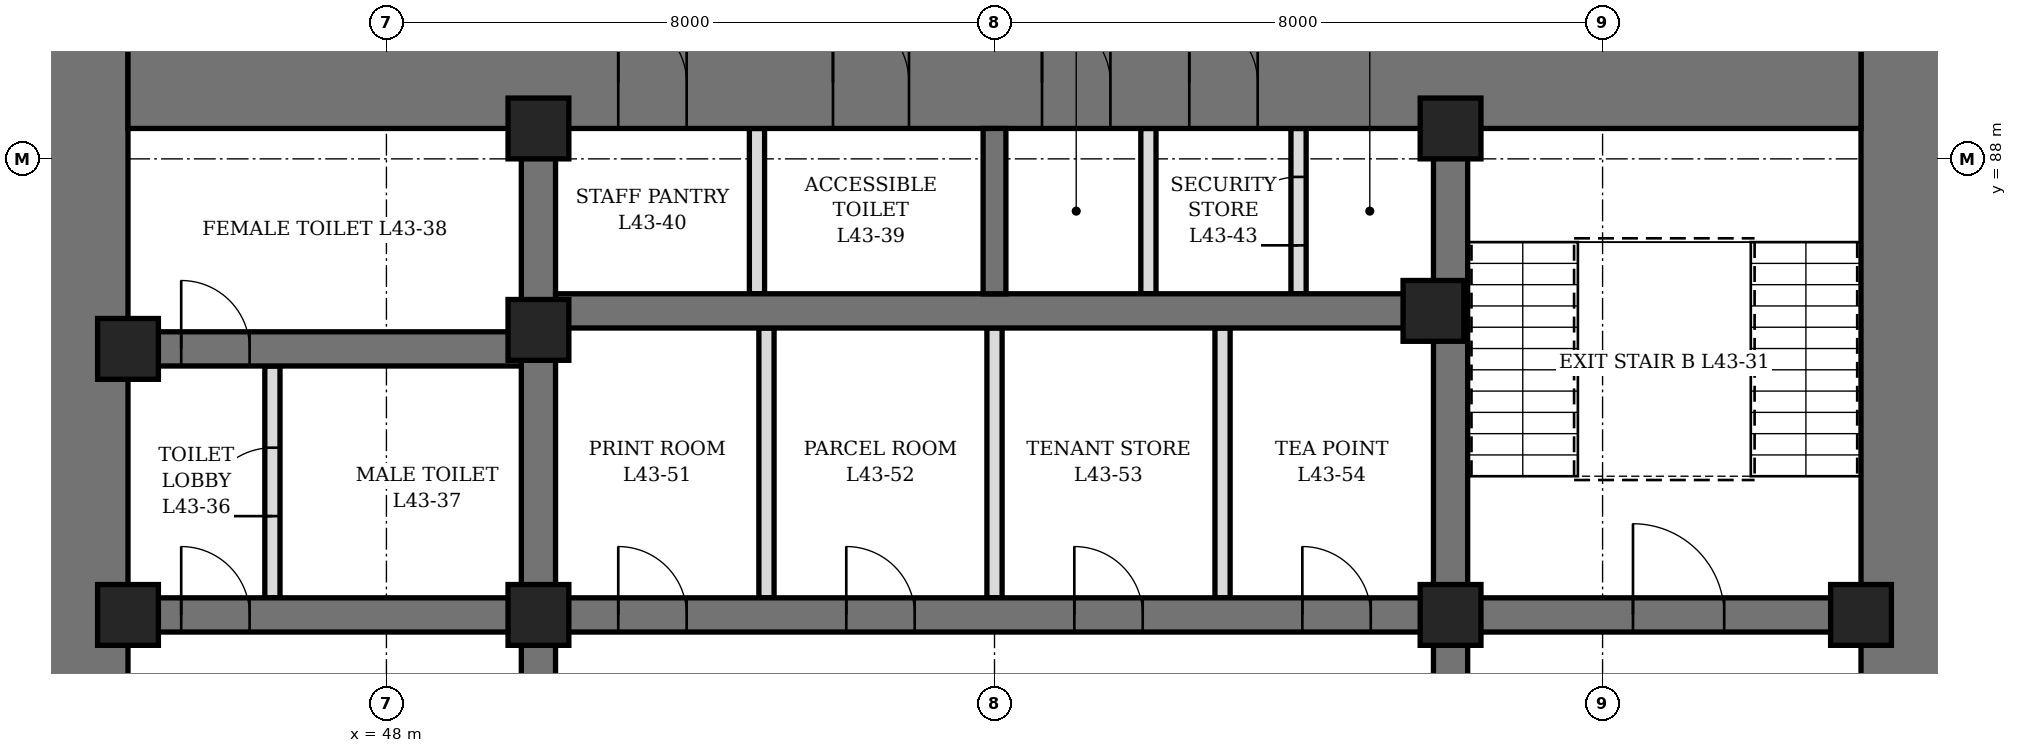
"""IFC4 building model, lengths in metres.
Left out: names, types, materials, properties, quantities, classifications, styles, units other than length and angle.
Written with IfcOpenShell. Run it as: python <this file> out.ifc"""

import sys

from ifc_helpers import new_model, si_unit, direction, frame, frame_2d, origin, origin_2d, place, context, subcontext, project, spatial, rectangle, hollow_rectangle, extrude, element, fill, save


model = new_model("IFC4")
c1 = context("Model", 3, precision=1e-05, world=origin(), true_north=direction((0.0, 1.0)))
c2 = subcontext(c1, "Body", "Model", "MODEL_VIEW")
j1 = project(units=[si_unit("LENGTHUNIT", "METRE"), si_unit("PLANEANGLEUNIT", "RADIAN")], contexts=[c1])
p1 = place(None, origin())
s1 = spatial("IfcSite", under=j1, at=p1, CompositionType="ELEMENT")
p2 = place(p1, origin())
s2 = spatial("IfcBuilding", under=s1, at=p2, CompositionType="ELEMENT")
p3 = place(p2, frame((0.0, 0.0, 193.9)))
s3 = spatial("IfcBuildingStorey", under=s2, at=p3, CompositionType="ELEMENT", Elevation=193.9)
p4 = place(p3, frame((44.0, 70.4, 0.0), z_axis=(0.0, 0.0, 1.0), x_axis=(0.0, 1.0, 0.0)))
e1 = element("IfcWall", 1, at=p4, inside=s3, PredefinedType="SHEAR", context=c2, shape_type="SweptSolid", body=[
    extrude(rectangle(XDim=19.2, YDim=1.2, at=frame_2d((9.6, 0.0))), origin(), (0.0, 0.0, 1.0), 4.2),
])
p5 = place(p4, frame((8.6, 0.0, 0.0)))
e2 = element("IfcOpeningElement", 2, at=p5, cuts=e1, PredefinedType="OPENING", context=c2, shape_type="SweptSolid", body=[
    extrude(rectangle(XDim=2.0, YDim=2.4, at=frame_2d((1.0, 1.2))), frame((0.0, 0.61, 0.0), z_axis=(0.0, -1.0, 0.0), x_axis=(1.0, 0.0, 0.0)), (0.0, 0.0, 1.0), 1.22),
])
p6 = place(p3, frame((68.0, 70.4, 0.0), z_axis=(0.0, 0.0, 1.0), x_axis=(0.0, 1.0, 0.0)))
e3 = element("IfcWall", 3, at=p6, inside=s3, PredefinedType="SHEAR", context=c2, shape_type="SweptSolid", body=[
    extrude(rectangle(XDim=19.2, YDim=1.2, at=frame_2d((9.6, 0.0))), origin(), (0.0, 0.0, 1.0), 4.2),
])
p7 = place(p6, frame((8.6, 0.0, 0.0)))
e4 = element("IfcOpeningElement", 4, at=p7, cuts=e3, PredefinedType="OPENING", context=c2, shape_type="SweptSolid", body=[
    extrude(rectangle(XDim=2.0, YDim=2.4, at=frame_2d((1.0, 1.2))), frame((0.0, 0.61, 0.0), z_axis=(0.0, -1.0, 0.0), x_axis=(1.0, 0.0, 0.0)), (0.0, 0.0, 1.0), 1.22),
])
p8 = place(p3, frame((44.6, 89.0, 0.0), z_axis=(0.0, 0.0, 1.0), x_axis=(1.0, 0.0, 0.0)))
e5 = element("IfcWall", 5, at=p8, inside=s3, PredefinedType="SHEAR", context=c2, shape_type="SweptSolid", body=[
    extrude(rectangle(XDim=22.8, YDim=1.2, at=frame_2d((11.4, 0.0))), origin(), (0.0, 0.0, 1.0), 4.2),
])
p9 = place(p8, frame((9.275, 0.0, 0.0)))
e6 = element("IfcOpeningElement", 6, at=p9, cuts=e5, PredefinedType="OPENING", context=c2, shape_type="SweptSolid", body=[
    extrude(rectangle(XDim=1.0, YDim=2.1, at=frame_2d((0.5, 1.05))), frame((0.0, 0.61, 0.0), z_axis=(0.0, -1.0, 0.0), x_axis=(1.0, 0.0, 0.0)), (0.0, 0.0, 1.0), 1.22),
])
p10 = place(p8, frame((6.45, 0.0, 0.0)))
e7 = element("IfcOpeningElement", 7, at=p10, cuts=e5, PredefinedType="OPENING", context=c2, shape_type="SweptSolid", body=[
    extrude(rectangle(XDim=0.9, YDim=2.1, at=frame_2d((0.45, 1.05))), frame((0.0, 0.61, 0.0), z_axis=(0.0, -1.0, 0.0), x_axis=(1.0, 0.0, 0.0)), (0.0, 0.0, 1.0), 1.22),
])
p11 = place(p8, frame((12.025, 0.0, 0.0)))
e8 = element("IfcOpeningElement", 8, at=p11, cuts=e5, PredefinedType="OPENING", context=c2, shape_type="SweptSolid", body=[
    extrude(rectangle(XDim=0.9, YDim=2.1, at=frame_2d((0.45, 1.05))), frame((0.0, 0.61, 0.0), z_axis=(0.0, -1.0, 0.0), x_axis=(1.0, 0.0, 0.0)), (0.0, 0.0, 1.0), 1.22),
])
p12 = place(p8, frame((13.962, 0.0, 0.0)))
e9 = element("IfcOpeningElement", 9, at=p12, cuts=e5, PredefinedType="OPENING", context=c2, shape_type="SweptSolid", body=[
    extrude(rectangle(XDim=0.9, YDim=2.1, at=frame_2d((0.45, 1.05))), frame((0.0, 0.61, 0.0), z_axis=(0.0, -1.0, 0.0), x_axis=(1.0, 0.0, 0.0)), (0.0, 0.0, 1.0), 1.22),
])
p13 = place(p3, frame((50.0, 71.6, 0.0), z_axis=(0.0, 0.0, 1.0), x_axis=(0.0, 1.0, 0.0)))
e10 = element("IfcWall", 10, at=p13, inside=s3, PredefinedType="SHEAR", context=c2, shape_type="SweptSolid", body=[
    extrude(rectangle(XDim=16.8, YDim=0.45, at=frame_2d((8.4, 0.0))), origin(), (0.0, 0.0, 1.0), 4.2),
])
p14 = place(p13, frame((7.5, 0.0, 0.0)))
e11 = element("IfcOpeningElement", 11, at=p14, cuts=e10, PredefinedType="OPENING", context=c2, shape_type="SweptSolid", body=[
    extrude(rectangle(XDim=1.8, YDim=2.4, at=frame_2d((0.9, 1.2))), frame((0.0, 0.235, 0.0), z_axis=(0.0, -1.0, 0.0), x_axis=(1.0, 0.0, 0.0)), (0.0, 0.0, 1.0), 0.47),
])
p15 = place(p3, frame((62.0, 71.6, 0.0), z_axis=(0.0, 0.0, 1.0), x_axis=(0.0, 1.0, 0.0)))
e12 = element("IfcWall", 12, at=p15, inside=s3, PredefinedType="SHEAR", context=c2, shape_type="SweptSolid", body=[
    extrude(rectangle(XDim=16.8, YDim=0.45, at=frame_2d((8.4, 0.0))), origin(), (0.0, 0.0, 1.0), 4.2),
])
p16 = place(p15, frame((7.5, 0.0, 0.0)))
e13 = element("IfcOpeningElement", 13, at=p16, cuts=e12, PredefinedType="OPENING", context=c2, shape_type="SweptSolid", body=[
    extrude(rectangle(XDim=1.8, YDim=2.4, at=frame_2d((0.9, 1.2))), frame((0.0, 0.235, 0.0), z_axis=(0.0, -1.0, 0.0), x_axis=(1.0, 0.0, 0.0)), (0.0, 0.0, 1.0), 0.47),
])
p17 = place(p3, frame((44.6, 82.0, 0.0), z_axis=(0.0, 0.0, 1.0), x_axis=(1.0, 0.0, 0.0)))
e14 = element("IfcWall", 14, at=p17, inside=s3, PredefinedType="SHEAR", context=c2, shape_type="SweptSolid", body=[
    extrude(rectangle(XDim=5.175, YDim=0.45, at=frame_2d((2.587, 0.0))), origin(), (0.0, 0.0, 1.0), 4.2),
])
p18 = place(p17, frame((0.7, 0.0, 0.0)))
e15 = element("IfcOpeningElement", 15, at=p18, cuts=e14, PredefinedType="OPENING", context=c2, shape_type="SweptSolid", body=[
    extrude(rectangle(XDim=0.9, YDim=2.1, at=frame_2d((0.45, 1.05))), frame((0.0, 0.235, 0.0), z_axis=(0.0, -1.0, 0.0), x_axis=(1.0, 0.0, 0.0)), (0.0, 0.0, 1.0), 0.47),
])
p19 = place(p3, frame((44.6, 85.5, 0.0), z_axis=(0.0, 0.0, 1.0), x_axis=(1.0, 0.0, 0.0)))
e16 = element("IfcWall", 16, at=p19, inside=s3, PredefinedType="SHEAR", context=c2, shape_type="SweptSolid", body=[
    extrude(rectangle(XDim=5.175, YDim=0.45, at=frame_2d((2.587, 0.0))), origin(), (0.0, 0.0, 1.0), 4.2),
])
p20 = place(p19, frame((0.7, 0.0, 0.0)))
e17 = element("IfcOpeningElement", 17, at=p20, cuts=e16, PredefinedType="OPENING", context=c2, shape_type="SweptSolid", body=[
    extrude(rectangle(XDim=0.9, YDim=2.1, at=frame_2d((0.45, 1.05))), frame((0.0, 0.235, 0.0), z_axis=(0.0, -1.0, 0.0), x_axis=(1.0, 0.0, 0.0)), (0.0, 0.0, 1.0), 0.47),
])
p21 = place(p3, frame((62.225, 82.0, 0.0), z_axis=(0.0, 0.0, 1.0), x_axis=(1.0, 0.0, 0.0)))
e18 = element("IfcWall", 18, at=p21, inside=s3, PredefinedType="SHEAR", context=c2, shape_type="SweptSolid", body=[
    extrude(rectangle(XDim=5.175, YDim=0.45, at=frame_2d((2.587, 0.0))), origin(), (0.0, 0.0, 1.0), 4.2),
])
p22 = place(p21, frame((2.175, 0.0, 0.0)))
e19 = element("IfcOpeningElement", 19, at=p22, cuts=e18, PredefinedType="OPENING", context=c2, shape_type="SweptSolid", body=[
    extrude(rectangle(XDim=1.2, YDim=2.1, at=frame_2d((0.6, 1.05))), frame((0.0, 0.235, 0.0), z_axis=(0.0, -1.0, 0.0), x_axis=(1.0, 0.0, 0.0)), (0.0, 0.0, 1.0), 0.47),
])
p23 = place(p3, frame((50.225, 82.0, 0.0), z_axis=(0.0, 0.0, 1.0), x_axis=(1.0, 0.0, 0.0)))
e20 = element("IfcWall", 20, at=p23, inside=s3, PredefinedType="SHEAR", context=c2, shape_type="SweptSolid", body=[
    extrude(rectangle(XDim=11.55, YDim=0.45, at=frame_2d((5.775, 0.0))), origin(), (0.0, 0.0, 1.0), 4.2),
])
p24 = place(p23, frame((0.825, 0.0, 0.0)))
e21 = element("IfcOpeningElement", 21, at=p24, cuts=e20, PredefinedType="OPENING", context=c2, shape_type="SweptSolid", body=[
    extrude(rectangle(XDim=0.9, YDim=2.1, at=frame_2d((0.45, 1.05))), frame((0.0, 0.235, 0.0), z_axis=(0.0, -1.0, 0.0), x_axis=(1.0, 0.0, 0.0)), (0.0, 0.0, 1.0), 0.47),
])
p25 = place(p23, frame((3.825, 0.0, 0.0)))
e22 = element("IfcOpeningElement", 22, at=p25, cuts=e20, PredefinedType="OPENING", context=c2, shape_type="SweptSolid", body=[
    extrude(rectangle(XDim=0.9, YDim=2.1, at=frame_2d((0.45, 1.05))), frame((0.0, 0.235, 0.0), z_axis=(0.0, -1.0, 0.0), x_axis=(1.0, 0.0, 0.0)), (0.0, 0.0, 1.0), 0.47),
])
p26 = place(p23, frame((6.825, 0.0, 0.0)))
e23 = element("IfcOpeningElement", 23, at=p26, cuts=e20, PredefinedType="OPENING", context=c2, shape_type="SweptSolid", body=[
    extrude(rectangle(XDim=0.9, YDim=2.1, at=frame_2d((0.45, 1.05))), frame((0.0, 0.235, 0.0), z_axis=(0.0, -1.0, 0.0), x_axis=(1.0, 0.0, 0.0)), (0.0, 0.0, 1.0), 0.47),
])
p27 = place(p23, frame((9.825, 0.0, 0.0)))
e24 = element("IfcOpeningElement", 24, at=p27, cuts=e20, PredefinedType="OPENING", context=c2, shape_type="SweptSolid", body=[
    extrude(rectangle(XDim=0.9, YDim=2.1, at=frame_2d((0.45, 1.05))), frame((0.0, 0.235, 0.0), z_axis=(0.0, -1.0, 0.0), x_axis=(1.0, 0.0, 0.0)), (0.0, 0.0, 1.0), 0.47),
])
p28 = place(p3, frame((50.225, 86.0, 0.0), z_axis=(0.0, 0.0, 1.0), x_axis=(1.0, 0.0, 0.0)))
e25 = element("IfcWall", 25, at=p28, inside=s3, PredefinedType="SHEAR", context=c2, shape_type="SweptSolid", body=[
    extrude(rectangle(XDim=11.55, YDim=0.45, at=frame_2d((5.775, 0.0))), origin(), (0.0, 0.0, 1.0), 4.2),
])
p29 = place(p3, frame((56.0, 86.225, 0.0), z_axis=(0.0, 0.0, 1.0), x_axis=(0.0, 1.0, 0.0)))
e26 = element("IfcWall", 26, at=p29, inside=s3, PredefinedType="SHEAR", context=c2, shape_type="SweptSolid", body=[
    extrude(rectangle(XDim=2.175, YDim=0.3, at=frame_2d((1.087, 0.0))), origin(), (0.0, 0.0, 1.0), 4.2),
])
for number, where, z_axis, x_axis in (
    (27, (44.6, 82.0, 0.0), (0.0, 0.0, 1.0), (1.0, 0.0, 0.0)),
    (28, (44.6, 85.5, 0.0), (0.0, 0.0, 1.0), (1.0, 0.0, 0.0)),
    (29, (50.0, 82.0, 0.0), (0.0, 0.0, 1.0), (1.0, 0.0, 0.0)),
    (30, (50.0, 85.75, 0.0), (0.0, 0.0, 1.0), (1.0, 0.0, 0.0)),
    (31, (50.0, 88.4, 0.0), (0.0, 0.0, 1.0), (1.0, 0.0, 0.0)),
    (32, (61.775, 86.0, 0.0), (0.0, 0.0, 1.0), (1.0, 0.0, 0.0)),
    (33, (62.0, 82.0, 0.0), (0.0, 0.0, 1.0), (1.0, 0.0, 0.0)),
    (34, (62.0, 88.4, 0.0), (0.0, 0.0, 1.0), (1.0, 0.0, 0.0)),
    (35, (67.4, 82.0, 0.0), (0.0, 0.0, 1.0), (1.0, 0.0, 0.0)),
):
    element("IfcColumn", number, at=place(p3, frame(where, z_axis=z_axis, x_axis=x_axis)), inside=s3, PredefinedType="COLUMN", context=c2, shape_type="SweptSolid", body=[
        extrude(hollow_rectangle(XDim=0.8, YDim=0.8, WallThickness=0.1, at=origin_2d()), origin(), (0.0, 0.0, 1.0), 4.2),
    ])
p30 = place(p3, frame((46.5, 82.225, 0.0), z_axis=(0.0, 0.0, 1.0), x_axis=(0.0, 1.0, 0.0)))
e36 = element("IfcWall", 36, at=p30, inside=s3, PredefinedType="PARTITIONING", context=c2, shape_type="SweptSolid", body=[
    extrude(rectangle(XDim=3.05, YDim=0.2, at=frame_2d((1.525, 0.0))), origin(), (0.0, 0.0, 1.0), 4.04),
])
p31 = place(p30, frame((1.075, 0.0, 0.0)))
e37 = element("IfcOpeningElement", 37, at=p31, cuts=e36, PredefinedType="OPENING", context=c2, shape_type="SweptSolid", body=[
    extrude(rectangle(XDim=0.9, YDim=2.1, at=frame_2d((0.45, 1.05))), frame((0.0, 0.11, 0.0), z_axis=(0.0, -1.0, 0.0), x_axis=(1.0, 0.0, 0.0)), (0.0, 0.0, 1.0), 0.22),
])
p32 = place(p3, frame((52.875, 86.225, 0.0), z_axis=(0.0, 0.0, 1.0), x_axis=(0.0, 1.0, 0.0)))
e38 = element("IfcWall", 38, at=p32, inside=s3, PredefinedType="PARTITIONING", context=c2, shape_type="SweptSolid", body=[
    extrude(rectangle(XDim=2.175, YDim=0.2, at=frame_2d((1.087, 0.0))), origin(), (0.0, 0.0, 1.0), 4.04),
])
p33 = place(p3, frame((60.0, 86.225, 0.0), z_axis=(0.0, 0.0, 1.0), x_axis=(0.0, 1.0, 0.0)))
e39 = element("IfcWall", 39, at=p33, inside=s3, PredefinedType="PARTITIONING", context=c2, shape_type="SweptSolid", body=[
    extrude(rectangle(XDim=2.175, YDim=0.2, at=frame_2d((1.087, 0.0))), origin(), (0.0, 0.0, 1.0), 4.04),
])
p34 = place(p33, frame((0.637, 0.0, 0.0)))
e40 = element("IfcOpeningElement", 40, at=p34, cuts=e39, PredefinedType="OPENING", context=c2, shape_type="SweptSolid", body=[
    extrude(rectangle(XDim=0.9, YDim=2.1, at=frame_2d((0.45, 1.05))), frame((0.0, 0.11, 0.0), z_axis=(0.0, -1.0, 0.0), x_axis=(1.0, 0.0, 0.0)), (0.0, 0.0, 1.0), 0.22),
])
p35 = place(p3, frame((58.025, 86.225, 0.0), z_axis=(0.0, 0.0, 1.0), x_axis=(0.0, 1.0, 0.0)))
e41 = element("IfcWall", 41, at=p35, inside=s3, PredefinedType="PARTITIONING", context=c2, shape_type="SweptSolid", body=[
    extrude(rectangle(XDim=2.175, YDim=0.2, at=frame_2d((1.087, 0.0))), origin(), (0.0, 0.0, 1.0), 4.04),
])
p36 = place(p3, frame((53.0, 82.225, 0.0), z_axis=(0.0, 0.0, 1.0), x_axis=(0.0, 1.0, 0.0)))
e42 = element("IfcWall", 42, at=p36, inside=s3, PredefinedType="PARTITIONING", context=c2, shape_type="SweptSolid", body=[
    extrude(rectangle(XDim=3.55, YDim=0.2, at=frame_2d((1.775, 0.0))), origin(), (0.0, 0.0, 1.0), 4.04),
])
p37 = place(p3, frame((56.0, 82.225, 0.0), z_axis=(0.0, 0.0, 1.0), x_axis=(0.0, 1.0, 0.0)))
e43 = element("IfcWall", 43, at=p37, inside=s3, PredefinedType="PARTITIONING", context=c2, shape_type="SweptSolid", body=[
    extrude(rectangle(XDim=3.55, YDim=0.2, at=frame_2d((1.775, 0.0))), origin(), (0.0, 0.0, 1.0), 3.14),
])
p38 = place(p3, frame((59.0, 82.225, 0.0), z_axis=(0.0, 0.0, 1.0), x_axis=(0.0, 1.0, 0.0)))
e44 = element("IfcWall", 44, at=p38, inside=s3, PredefinedType="PARTITIONING", context=c2, shape_type="SweptSolid", body=[
    extrude(rectangle(XDim=3.55, YDim=0.2, at=frame_2d((1.775, 0.0))), origin(), (0.0, 0.0, 1.0), 4.04),
])
p39 = place(p18, origin())
e45 = element("IfcDoor", 45, at=p39, inside=s3, OperationType="SINGLE_SWING_LEFT", PredefinedType="DOOR", context=c2, shape_type="SweptSolid", body=[
    extrude(rectangle(XDim=0.9, YDim=2.1, at=frame_2d((0.45, 1.05))), frame((0.0, 0.225, 0.0), z_axis=(0.0, -1.0, 0.0), x_axis=(1.0, 0.0, 0.0)), (0.0, 0.0, 1.0), 0.449),
])
fill(e15, e45)
p40 = place(p31, origin())
e46 = element("IfcDoor", 46, at=p40, inside=s3, OperationType="SINGLE_SWING_RIGHT", PredefinedType="DOOR", context=c2, shape_type="SweptSolid", body=[
    extrude(rectangle(XDim=0.9, YDim=2.1, at=frame_2d((0.45, 1.05))), frame((0.0, 0.1, 0.0), z_axis=(0.0, -1.0, 0.0), x_axis=(1.0, 0.0, 0.0)), (0.0, 0.0, 1.0), 0.199),
])
fill(e37, e46)
p41 = place(p20, origin())
e47 = element("IfcDoor", 47, at=p41, inside=s3, OperationType="SINGLE_SWING_RIGHT", PredefinedType="DOOR", context=c2, shape_type="SweptSolid", body=[
    extrude(rectangle(XDim=0.9, YDim=2.1, at=frame_2d((0.45, 1.05))), frame((0.0, 0.225, 0.0), z_axis=(0.0, -1.0, 0.0), x_axis=(1.0, 0.0, 0.0)), (0.0, 0.0, 1.0), 0.449),
])
fill(e17, e47)
p42 = place(p9, origin())
e48 = element("IfcDoor", 48, at=p42, inside=s3, OperationType="SINGLE_SWING_LEFT", PredefinedType="DOOR", context=c2, shape_type="SweptSolid", body=[
    extrude(rectangle(XDim=1.0, YDim=2.1, at=frame_2d((0.5, 1.05))), frame((0.0, 0.35, 0.0), z_axis=(0.0, -1.0, 0.0), x_axis=(1.0, 0.0, 0.0)), (0.0, 0.0, 1.0), 0.7),
])
fill(e6, e48)
p43 = place(p10, origin())
e49 = element("IfcDoor", 49, at=p43, inside=s3, OperationType="SINGLE_SWING_LEFT", PredefinedType="DOOR", context=c2, shape_type="SweptSolid", body=[
    extrude(rectangle(XDim=0.9, YDim=2.1, at=frame_2d((0.45, 1.05))), frame((0.0, 0.35, 0.0), z_axis=(0.0, -1.0, 0.0), x_axis=(1.0, 0.0, 0.0)), (0.0, 0.0, 1.0), 0.7),
])
fill(e7, e49)
p44 = place(p11, origin())
e50 = element("IfcDoor", 50, at=p44, inside=s3, OperationType="SINGLE_SWING_LEFT", PredefinedType="DOOR", context=c2, shape_type="SweptSolid", body=[
    extrude(rectangle(XDim=0.9, YDim=2.1, at=frame_2d((0.45, 1.05))), frame((0.0, 0.35, 0.0), z_axis=(0.0, -1.0, 0.0), x_axis=(1.0, 0.0, 0.0)), (0.0, 0.0, 1.0), 0.7),
])
fill(e8, e50)
p45 = place(p12, origin())
e51 = element("IfcDoor", 51, at=p45, inside=s3, OperationType="SINGLE_SWING_LEFT", PredefinedType="DOOR", context=c2, shape_type="SweptSolid", body=[
    extrude(rectangle(XDim=0.9, YDim=2.1, at=frame_2d((0.45, 1.05))), frame((0.0, 0.35, 0.0), z_axis=(0.0, -1.0, 0.0), x_axis=(1.0, 0.0, 0.0)), (0.0, 0.0, 1.0), 0.7),
])
fill(e9, e51)
p46 = place(p34, origin())
e52 = element("IfcDoor", 52, at=p46, inside=s3, OperationType="SINGLE_SWING_LEFT", PredefinedType="DOOR", context=c2, shape_type="SweptSolid", body=[
    extrude(rectangle(XDim=0.9, YDim=2.1, at=frame_2d((0.45, 1.05))), frame((0.0, 0.1, 0.0), z_axis=(0.0, -1.0, 0.0), x_axis=(1.0, 0.0, 0.0)), (0.0, 0.0, 1.0), 0.199),
])
fill(e40, e52)
p47 = place(p24, origin())
e53 = element("IfcDoor", 53, at=p47, inside=s3, OperationType="SINGLE_SWING_LEFT", PredefinedType="DOOR", context=c2, shape_type="SweptSolid", body=[
    extrude(rectangle(XDim=0.9, YDim=2.1, at=frame_2d((0.45, 1.05))), frame((0.0, 0.225, 0.0), z_axis=(0.0, -1.0, 0.0), x_axis=(1.0, 0.0, 0.0)), (0.0, 0.0, 1.0), 0.449),
])
fill(e21, e53)
p48 = place(p25, origin())
e54 = element("IfcDoor", 54, at=p48, inside=s3, OperationType="SINGLE_SWING_LEFT", PredefinedType="DOOR", context=c2, shape_type="SweptSolid", body=[
    extrude(rectangle(XDim=0.9, YDim=2.1, at=frame_2d((0.45, 1.05))), frame((0.0, 0.225, 0.0), z_axis=(0.0, -1.0, 0.0), x_axis=(1.0, 0.0, 0.0)), (0.0, 0.0, 1.0), 0.449),
])
fill(e22, e54)
p49 = place(p26, origin())
e55 = element("IfcDoor", 55, at=p49, inside=s3, OperationType="SINGLE_SWING_LEFT", PredefinedType="DOOR", context=c2, shape_type="SweptSolid", body=[
    extrude(rectangle(XDim=0.9, YDim=2.1, at=frame_2d((0.45, 1.05))), frame((0.0, 0.225, 0.0), z_axis=(0.0, -1.0, 0.0), x_axis=(1.0, 0.0, 0.0)), (0.0, 0.0, 1.0), 0.449),
])
fill(e23, e55)
p50 = place(p27, origin())
e56 = element("IfcDoor", 56, at=p50, inside=s3, OperationType="SINGLE_SWING_LEFT", PredefinedType="DOOR", context=c2, shape_type="SweptSolid", body=[
    extrude(rectangle(XDim=0.9, YDim=2.1, at=frame_2d((0.45, 1.05))), frame((0.0, 0.225, 0.0), z_axis=(0.0, -1.0, 0.0), x_axis=(1.0, 0.0, 0.0)), (0.0, 0.0, 1.0), 0.449),
])
fill(e24, e56)
p51 = place(p22, origin())
e57 = element("IfcDoor", 57, at=p51, inside=s3, OperationType="SINGLE_SWING_LEFT", PredefinedType="DOOR", context=c2, shape_type="SweptSolid", body=[
    extrude(rectangle(XDim=1.2, YDim=2.1, at=frame_2d((0.6, 1.05))), frame((0.0, 0.225, 0.0), z_axis=(0.0, -1.0, 0.0), x_axis=(1.0, 0.0, 0.0)), (0.0, 0.0, 1.0), 0.449),
])
fill(e19, e57)
save(model, sys.argv[1])
